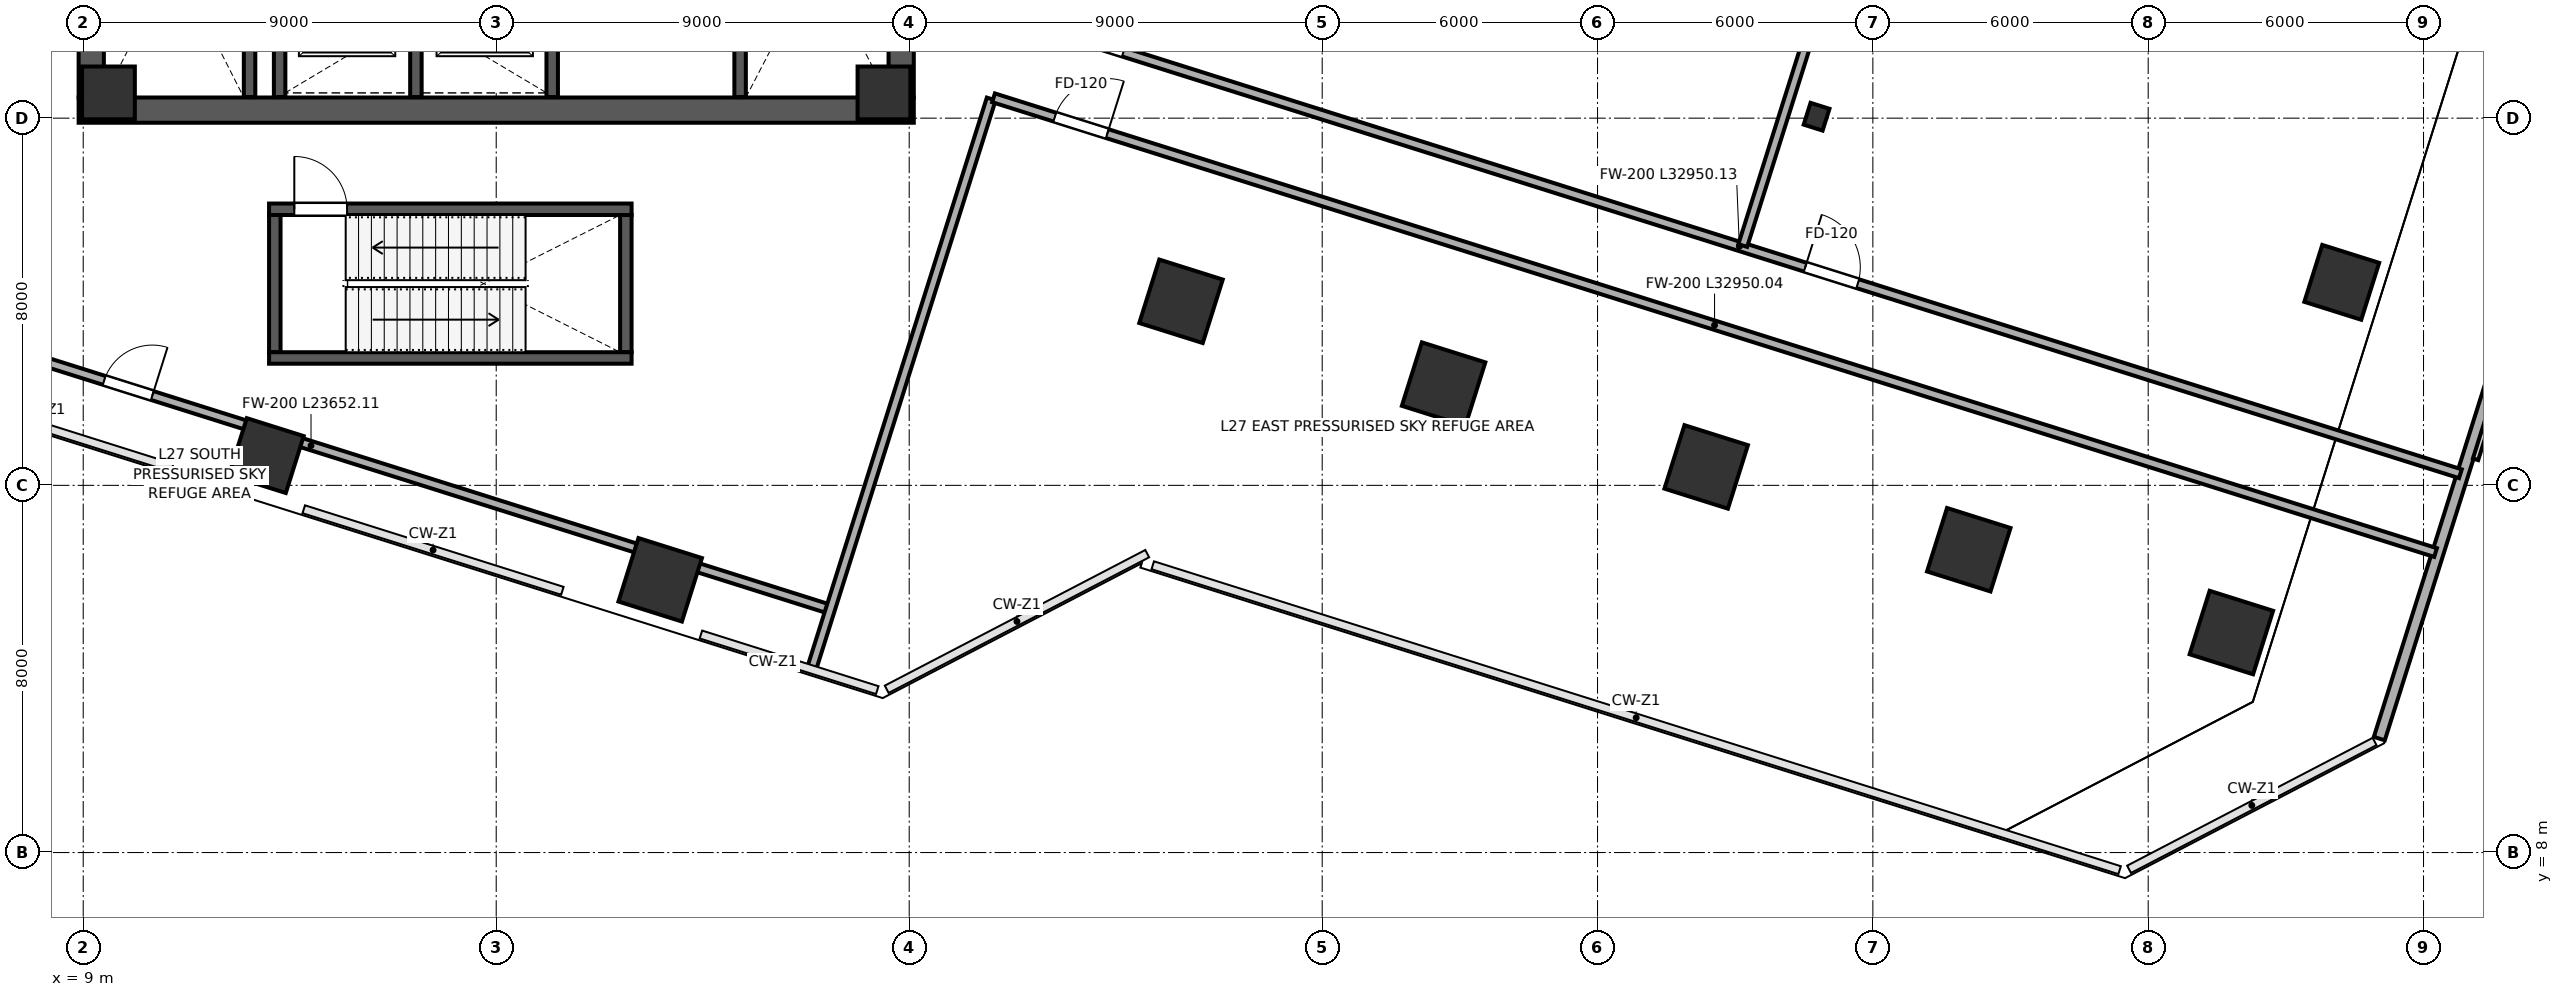
"""IFC4 building model, lengths in metres.
Left out: names, types, materials, properties, quantities, classifications, styles, units other than length and angle.
Written with IfcOpenShell. Run it as: python <this file> out.ifc"""

import sys

from ifc_helpers import new_model, si_unit, direction, frame, frame_2d, origin, origin_2d, place, context, subcontext, project, spatial, rectangle, i_section, extrude, clip, halfspace, source, transform, mapped, element, fill, save


model = new_model("IFC4")
c1 = context("Model", 3, precision=1e-05, world=origin(), true_north=direction((0.0, 1.0)))
c2 = subcontext(c1, "Body", "Model", "MODEL_VIEW")
j1 = project(units=[si_unit("LENGTHUNIT", "METRE"), si_unit("PLANEANGLEUNIT", "RADIAN")], contexts=[c1])
p1 = place(None, origin())
s1 = spatial("IfcSite", under=j1, at=p1, CompositionType="ELEMENT")
p2 = place(p1, origin())
s2 = spatial("IfcBuilding", under=s1, at=p2, CompositionType="ELEMENT")
p3 = place(p2, frame((0.0, 0.0, 122.2)))
s3 = spatial("IfcBuildingStorey", under=s2, at=p3, CompositionType="ELEMENT", Elevation=122.2)
m1 = source(origin(), c2, "Body", "SweptSolid", [
    extrude(rectangle(XDim=1.15, YDim=1.15, at=origin_2d()), origin(), (0.0, 0.0, 1.0), 5.399),
])
for number, where, z_axis, x_axis in (
    (1, (9.55, 24.55, 0.001), (0.0, 0.0, 1.0), (1.0, 0.0, 0.0)),
    (2, (26.45, 24.55, 0.001), (0.0, 0.0, 1.0), (1.0, 0.0, 0.0)),
):
    element("IfcColumn", number, at=place(p3, frame(where, z_axis=z_axis, x_axis=x_axis)), inside=s3, PredefinedType="COLUMN", context=c2, shape_type="MappedRepresentation", body=[
        mapped(m1, transform((0.0, 0.0, 0.0), scale=1.0)),
    ])
p4 = place(p3, frame((12.99, 16.648, 0.0), z_axis=(-0.121304858025, 0.070768627504, 0.990089355958), x_axis=(0.737750355409, 0.673751419219, 0.042230773063)))
e3 = element("IfcColumn", 3, at=p4, inside=s3, PredefinedType="COLUMN", context=c2, shape_type="Clipping", body=[
    clip(clip(extrude(rectangle(XDim=1.3, YDim=1.3, at=origin_2d()), origin(), (0.0, 0.0, 1.0), 5.454), halfspace(frame((0.0, 0.0, 0.116), z_axis=(0.0, 0.0, -1.0), x_axis=(1.0, 0.0, 0.0)), False)), halfspace(frame((0.0, 0.0, 5.338), z_axis=(0.0, 0.0, 1.0), x_axis=(1.0, 0.0, 0.0)), False)),
])
p5 = place(p3, frame((21.573, 13.942, 0.0), z_axis=(-0.14432009632, 0.002594719649, 0.989527653594), x_axis=(0.314652655865, 0.94821396347, 0.043404903384)))
e4 = element("IfcColumn", 4, at=p5, inside=s3, PredefinedType="COLUMN", context=c2, shape_type="Clipping", body=[
    clip(clip(extrude(rectangle(XDim=1.45, YDim=1.45, at=origin_2d()), origin(), (0.0, 0.0, 1.0), 5.457), halfspace(frame((0.0, 0.0, 0.133), z_axis=(0.0, 0.0, -1.0), x_axis=(1.0, 0.0, 0.0)), False)), halfspace(frame((0.0, 0.0, 5.324), z_axis=(0.0, 0.0, 1.0), x_axis=(1.0, 0.0, 0.0)), False)),
])
p6 = place(p3, frame((32.923, 20.01, 0.0), z_axis=(-0.097956530898, -0.089352846574, 0.991171320642), x_axis=(-0.422523517598, 0.905474614008, 0.039869793881)))
e5 = element("IfcColumn", 5, at=p6, inside=s3, PredefinedType="COLUMN", context=c2, shape_type="Clipping", body=[
    clip(clip(extrude(rectangle(XDim=1.45, YDim=1.45, at=origin_2d()), origin(), (0.0, 0.0, 1.0), 5.448), halfspace(frame((0.0, 0.0, 0.122), z_axis=(0.0, 0.0, -1.0), x_axis=(1.0, 0.0, 0.0)), False)), halfspace(frame((0.0, 0.0, 5.326), z_axis=(0.0, 0.0, 1.0), x_axis=(1.0, 0.0, 0.0)), False)),
])
p7 = place(p3, frame((38.646, 18.206, 0.0), z_axis=(-0.112659680016, -0.133980891682, 0.984559250204), x_axis=(-0.539415178106, 0.840393001033, 0.052639048661)))
e6 = element("IfcColumn", 6, at=p7, inside=s3, PredefinedType="COLUMN", context=c2, shape_type="Clipping", body=[
    clip(clip(extrude(rectangle(XDim=1.45, YDim=1.45, at=origin_2d()), origin(), (0.0, 0.0, 1.0), 5.485), halfspace(frame((0.0, 0.0, 0.162), z_axis=(0.0, 0.0, -1.0), x_axis=(1.0, 0.0, 0.0)), False)), halfspace(frame((0.0, 0.0, 5.323), z_axis=(0.0, 0.0, 1.0), x_axis=(1.0, 0.0, 0.0)), False)),
])
p8 = place(p3, frame((44.368, 16.402, 0.0), z_axis=(-0.126889220924, -0.177583141244, 0.975891056194), x_axis=(-0.605373038396, 0.793231359264, 0.06563150968)))
e7 = element("IfcColumn", 7, at=p8, inside=s3, PredefinedType="COLUMN", context=c2, shape_type="Clipping", body=[
    clip(clip(extrude(rectangle(XDim=1.45, YDim=1.45, at=origin_2d()), origin(), (0.0, 0.0, 1.0), 5.533), halfspace(frame((0.0, 0.0, 0.204), z_axis=(0.0, 0.0, -1.0), x_axis=(1.0, 0.0, 0.0)), False)), halfspace(frame((0.0, 0.0, 5.329), z_axis=(0.0, 0.0, 1.0), x_axis=(1.0, 0.0, 0.0)), False)),
])
p9 = place(p3, frame((46.773, 24.031, 0.0), z_axis=(-0.067285029027, -0.198230006674, 0.977843335777), x_axis=(-0.808599445891, 0.584982341111, 0.062949159587)))
e8 = element("IfcColumn", 8, at=p9, inside=s3, PredefinedType="COLUMN", context=c2, shape_type="Clipping", body=[
    clip(clip(extrude(i_section(OverallWidth=0.432, OverallDepth=0.498, WebThickness=0.056, FlangeThickness=0.089, FilletRadius=0.015, at=origin_2d()), origin(), (0.0, 0.0, 1.0), 5.522), halfspace(frame((0.0, 0.0, 0.065), z_axis=(0.0, 0.0, -1.0), x_axis=(1.0, 0.0, 0.0)), False)), halfspace(frame((0.0, 0.0, 5.457), z_axis=(0.0, 0.0, 1.0), x_axis=(1.0, 0.0, 0.0)), False)),
])
m2 = source(origin(), c2, "Body", "SweptSolid", [
    extrude(rectangle(XDim=1.45, YDim=1.45, at=origin_2d()), origin(), (0.0, 0.0, 1.0), 5.199),
])
p10 = place(p3, frame((50.09, 14.597, 0.001), z_axis=(0.0, 0.0, 1.0), x_axis=(-0.953716950748, 0.300705799504, 0.0)))
e9 = element("IfcColumn", 9, at=p10, inside=s3, PredefinedType="COLUMN", context=c2, shape_type="MappedRepresentation", body=[
    mapped(m2, transform((0.0, 0.0, 0.0), scale=1.0)),
])
m3 = source(origin(), c2, "Body", "SweptSolid", [
    extrude(rectangle(XDim=1.45, YDim=1.45, at=origin_2d()), origin(), (0.0, 0.0, 1.0), 5.199),
])
p11 = place(p3, frame((55.812, 12.793, 0.001), z_axis=(0.0, 0.0, 1.0), x_axis=(-0.953716950748, 0.300705799504, 0.0)))
e10 = element("IfcColumn", 10, at=p11, inside=s3, PredefinedType="COLUMN", context=c2, shape_type="MappedRepresentation", body=[
    mapped(m3, transform((0.0, 0.0, 0.0), scale=1.0)),
])
m4 = source(origin(), c2, "Body", "SweptSolid", [
    extrude(rectangle(XDim=1.3, YDim=1.3, at=origin_2d()), origin(), (0.0, 0.0, 1.0), 5.199),
])
p12 = place(p3, frame((58.218, 20.423, 0.001), z_axis=(0.0, 0.0, 1.0), x_axis=(-0.953716950748, 0.300705799504, 0.0)))
e11 = element("IfcColumn", 11, at=p12, inside=s3, PredefinedType="COLUMN", context=c2, shape_type="MappedRepresentation", body=[
    mapped(m4, transform((0.0, 0.0, 0.0), scale=1.0)),
])
p13 = place(p3, frame((59.037, 10.482, 0.0), z_axis=(0.0, 0.0, 1.0), x_axis=(0.300700770817, 0.953718536273, 0.0)))
e12 = element("IfcWall", 12, at=p13, inside=s3, PredefinedType="SOLIDWALL", context=c2, shape_type="SweptSolid", body=[
    extrude(rectangle(XDim=20.868, YDim=0.25, at=frame_2d((10.434, 0.0))), origin(), (0.0, 0.0, 1.0), 5.12),
])
p14 = place(p3, frame((8.242, 48.379, 0.0), z_axis=(0.0, 0.0, 1.0), x_axis=(-0.300707309749, -0.953716474569, 0.0)))
e13 = element("IfcWall", 13, at=p14, inside=s3, PredefinedType="SOLIDWALL", context=c2, shape_type="SweptSolid", body=[
    extrude(rectangle(XDim=25.268, YDim=0.25, at=frame_2d((12.634, 0.0))), origin(), (0.0, 0.0, 1.0), 4.255),
])
p15 = place(p3, frame((9.175, 24.45, 0.0), z_axis=(0.0, 0.0, 1.0), x_axis=(0.0, 1.0, 0.0)))
e14 = element("IfcWall", 14, at=p15, inside=s3, PredefinedType="SHEAR", context=c2, shape_type="SweptSolid", body=[
    extrude(rectangle(XDim=15.1, YDim=0.55, at=frame_2d((7.55, 0.0))), origin(), (0.0, 0.0, 1.0), 5.12),
])
p16 = place(p3, frame((26.825, 24.45, 0.0), z_axis=(0.0, 0.0, 1.0), x_axis=(0.0, 1.0, 0.0)))
e15 = element("IfcWall", 15, at=p16, inside=s3, PredefinedType="SHEAR", context=c2, shape_type="SweptSolid", body=[
    extrude(rectangle(XDim=15.1, YDim=0.55, at=frame_2d((7.55, 0.0))), origin(), (0.0, 0.0, 1.0), 5.12),
])
p17 = place(p16, frame((8.6, 0.0, 0.0)))
e16 = element("IfcOpeningElement", 16, at=p17, cuts=e15, PredefinedType="OPENING", context=c2, shape_type="SweptSolid", body=[
    extrude(rectangle(XDim=1.15, YDim=2.2, at=frame_2d((0.575, 1.1))), frame((0.0, 0.285, 0.0), z_axis=(0.0, -1.0, 0.0), x_axis=(1.0, 0.0, 0.0)), (0.0, 0.0, 1.0), 0.57),
])
p18 = place(p3, frame((8.9, 24.175, 0.0), z_axis=(0.0, 0.0, 1.0), x_axis=(1.0, 0.0, 0.0)))
e17 = element("IfcWall", 17, at=p18, inside=s3, PredefinedType="SHEAR", context=c2, shape_type="SweptSolid", body=[
    extrude(rectangle(XDim=18.2, YDim=0.55, at=frame_2d((9.1, 0.0))), origin(), (0.0, 0.0, 1.0), 5.12),
])
p19 = place(p3, frame((12.625, 24.46, 0.0), z_axis=(0.0, 0.0, 1.0), x_axis=(0.0, 1.0, 0.0)))
e18 = element("IfcWall", 18, at=p19, inside=s3, PredefinedType="SHEAR", context=c2, shape_type="SweptSolid", body=[
    extrude(rectangle(XDim=7.49, YDim=0.25, at=frame_2d((3.745, 0.0))), origin(), (0.0, 0.0, 1.0), 5.12),
])
p20 = place(p19, frame((5.85, 0.0, 0.0)))
e19 = element("IfcOpeningElement", 19, at=p20, cuts=e18, PredefinedType="OPENING", context=c2, shape_type="SweptSolid", body=[
    extrude(rectangle(XDim=1.15, YDim=2.2, at=frame_2d((0.575, 1.1))), frame((0.0, 0.135, 0.0), z_axis=(0.0, -1.0, 0.0), x_axis=(1.0, 0.0, 0.0)), (0.0, 0.0, 1.0), 0.27),
])
p21 = place(p3, frame((23.315, 24.46, 0.0), z_axis=(0.0, 0.0, 1.0), x_axis=(0.0, 1.0, 0.0)))
e20 = element("IfcWall", 20, at=p21, inside=s3, PredefinedType="SHEAR", context=c2, shape_type="SweptSolid", body=[
    extrude(rectangle(XDim=7.49, YDim=0.25, at=frame_2d((3.745, 0.0))), origin(), (0.0, 0.0, 1.0), 5.12),
])
for number, where, z_axis, x_axis in (
    (21, (13.28, 24.46, 0.0), (0.0, 0.0, 1.0), (0.0, 1.0, 0.0)),
    (22, (16.25, 24.46, 0.0), (0.0, 0.0, 1.0), (0.0, 1.0, 0.0)),
    (23, (19.22, 24.46, 0.0), (0.0, 0.0, 1.0), (0.0, 1.0, 0.0)),
):
    element("IfcWall", number, at=place(p3, frame(where, z_axis=z_axis, x_axis=x_axis)), inside=s3, PredefinedType="SHEAR", context=c2, shape_type="SweptSolid", body=[
        extrude(rectangle(XDim=3.49, YDim=0.25, at=frame_2d((1.745, 0.0))), origin(), (0.0, 0.0, 1.0), 5.12),
    ])
for number, where, z_axis, x_axis in (
    (24, (13.175, 18.9, 0.0), (0.0, 0.0, 1.0), (0.0, 1.0, 0.0)),
    (25, (20.825, 18.9, 0.0), (0.0, 0.0, 1.0), (0.0, 1.0, 0.0)),
):
    element("IfcWall", number, at=place(p3, frame(where, z_axis=z_axis, x_axis=x_axis)), inside=s3, PredefinedType="SHEAR", context=c2, shape_type="SweptSolid", body=[
        extrude(rectangle(XDim=2.99, YDim=0.25, at=frame_2d((1.495, 0.0))), origin(), (0.0, 0.0, 1.0), 5.12),
    ])
p22 = place(p3, frame((13.05, 18.775, 0.0), z_axis=(0.0, 0.0, 1.0), x_axis=(1.0, 0.0, 0.0)))
e26 = element("IfcWall", 26, at=p22, inside=s3, PredefinedType="SHEAR", context=c2, shape_type="SweptSolid", body=[
    extrude(rectangle(XDim=7.9, YDim=0.25, at=frame_2d((3.95, 0.0))), origin(), (0.0, 0.0, 1.0), 5.12),
])
p23 = place(p3, frame((13.05, 22.015, 0.0), z_axis=(0.0, 0.0, 1.0), x_axis=(1.0, 0.0, 0.0)))
e27 = element("IfcWall", 27, at=p23, inside=s3, PredefinedType="SHEAR", context=c2, shape_type="SweptSolid", body=[
    extrude(rectangle(XDim=7.9, YDim=0.25, at=frame_2d((3.95, 0.0))), origin(), (0.0, 0.0, 1.0), 5.12),
])
p24 = place(p23, frame((0.55, 0.0, 0.0)))
e28 = element("IfcOpeningElement", 28, at=p24, cuts=e27, PredefinedType="OPENING", context=c2, shape_type="SweptSolid", body=[
    extrude(rectangle(XDim=1.15, YDim=2.2, at=frame_2d((0.575, 1.1))), frame((0.0, 0.135, 0.0), z_axis=(0.0, -1.0, 0.0), x_axis=(1.0, 0.0, 0.0)), (0.0, 0.0, 1.0), 0.27),
])
p25 = place(p3, frame((2.686, 20.422, 0.0), z_axis=(0.0, 0.0, 1.0), x_axis=(0.953714083977, -0.30071489159, 0.0)))
e29 = element("IfcWall", 29, at=p25, inside=s3, PredefinedType="SOLIDWALL", context=c2, shape_type="SweptSolid", body=[
    extrude(rectangle(XDim=23.652, YDim=0.2, at=frame_2d((11.826, 0.0))), origin(), (0.0, 0.0, 1.0), 4.255),
])
p26 = place(p25, frame((7.1, 0.0, 0.0)))
e30 = element("IfcOpeningElement", 30, at=p26, cuts=e29, PredefinedType="OPENING", context=c2, shape_type="SweptSolid", body=[
    extrude(rectangle(XDim=1.1, YDim=2.2, at=frame_2d((0.55, 1.1))), frame((0.0, 0.11, 0.0), z_axis=(0.0, -1.0, 0.0), x_axis=(1.0, 0.0, 0.0)), (0.0, 0.0, 1.0), 0.22),
])
p27 = place(p3, frame((24.884, 12.039, 0.0), z_axis=(0.0, 0.0, 1.0), x_axis=(0.300719056834, 0.953712770627, 0.0)))
e31 = element("IfcWall", 31, at=p27, inside=s3, PredefinedType="SOLIDWALL", context=c2, shape_type="SweptSolid", body=[
    extrude(rectangle(XDim=12.98, YDim=0.2, at=frame_2d((6.49, 0.0))), origin(), (0.0, 0.0, 1.0), 5.12),
])
p28 = place(p3, frame((28.837, 24.444, 0.0), z_axis=(0.0, 0.0, 1.0), x_axis=(0.953717618417, -0.300703681921, 0.0)))
e32 = element("IfcWall", 32, at=p28, inside=s3, PredefinedType="SOLIDWALL", context=c2, shape_type="SweptSolid", body=[
    extrude(rectangle(XDim=32.95, YDim=0.2, at=frame_2d((16.475, 0.0))), origin(), (0.0, 0.0, 1.0), 4.255),
])
p29 = place(p28, frame((1.4, 0.0, 0.0)))
e33 = element("IfcOpeningElement", 33, at=p29, cuts=e32, PredefinedType="OPENING", context=c2, shape_type="SweptSolid", body=[
    extrude(rectangle(XDim=1.2, YDim=2.2, at=frame_2d((0.6, 1.1))), frame((0.0, 0.11, 0.0), z_axis=(0.0, -1.0, 0.0), x_axis=(1.0, 0.0, 0.0)), (0.0, 0.0, 1.0), 0.22),
])
p30 = place(p3, frame((29.379, 26.161, 0.0), z_axis=(0.0, 0.0, 1.0), x_axis=(0.953715493479, -0.300710421334, 0.0)))
e34 = element("IfcWall", 34, at=p30, inside=s3, PredefinedType="SOLIDWALL", context=c2, shape_type="SweptSolid", body=[
    extrude(rectangle(XDim=32.95, YDim=0.2, at=frame_2d((16.475, 0.0))), origin(), (0.0, 0.0, 1.0), 4.255),
])
p31 = place(p30, frame((1.2, 0.0, 0.0)))
e35 = element("IfcOpeningElement", 35, at=p31, cuts=e34, PredefinedType="OPENING", context=c2, shape_type="SweptSolid", body=[
    extrude(rectangle(XDim=1.2, YDim=2.2, at=frame_2d((0.6, 1.1))), frame((0.0, 0.11, 0.0), z_axis=(0.0, -1.0, 0.0), x_axis=(1.0, 0.0, 0.0)), (0.0, 0.0, 1.0), 0.22),
])
p32 = place(p30, frame((17.98, 0.0, 0.0)))
e36 = element("IfcOpeningElement", 36, at=p32, cuts=e34, PredefinedType="OPENING", context=c2, shape_type="SweptSolid", body=[
    extrude(rectangle(XDim=1.2, YDim=2.2, at=frame_2d((0.6, 1.1))), frame((0.0, 0.11, 0.0), z_axis=(0.0, -1.0, 0.0), x_axis=(1.0, 0.0, 0.0)), (0.0, 0.0, 1.0), 0.22),
])
p33 = place(p3, frame((45.165, 21.225, 0.0), z_axis=(0.0, 0.0, 1.0), x_axis=(0.300708557869, 0.953716081035, 0.0)))
e37 = element("IfcWall", 37, at=p33, inside=s3, PredefinedType="SOLIDWALL", context=c2, shape_type="SweptSolid", body=[
    extrude(rectangle(XDim=19.18, YDim=0.2, at=frame_2d((9.59, 0.0))), origin(), (0.0, 0.0, 1.0), 4.255),
])
m5 = source(origin(), c2, "Body", "SweptSolid", [
    extrude(rectangle(XDim=1.15, YDim=2.2, at=frame_2d((0.575, 1.1))), frame((0.0, 0.025, 0.0), z_axis=(0.0, -1.0, 0.0), x_axis=(1.0, 0.0, 0.0)), (0.0, 0.0, 1.0), 0.05),
])
p34 = place(p24, origin())
e38 = element("IfcDoor", 38, at=p34, inside=s3, OperationType="SINGLE_SWING_LEFT", PredefinedType="DOOR", context=c2, shape_type="MappedRepresentation", body=[
    mapped(m5, transform((0.0, 0.0, 0.0), scale=1.0)),
])
fill(e28, e38)
m6 = source(origin(), c2, "Body", "SweptSolid", [
    extrude(rectangle(XDim=1.1, YDim=2.2, at=frame_2d((0.55, 1.1))), frame((0.0, 0.025, 0.0), z_axis=(0.0, -1.0, 0.0), x_axis=(1.0, 0.0, 0.0)), (0.0, 0.0, 1.0), 0.05),
])
p35 = place(p26, origin())
e39 = element("IfcDoor", 39, at=p35, inside=s3, OperationType="SINGLE_SWING_RIGHT", PredefinedType="DOOR", context=c2, shape_type="MappedRepresentation", body=[
    mapped(m6, transform((0.0, 0.0, 0.0), scale=1.0)),
])
fill(e30, e39)
m7 = source(origin(), c2, "Body", "SweptSolid", [
    extrude(rectangle(XDim=1.2, YDim=2.2, at=frame_2d((0.6, 1.1))), frame((0.0, 0.025, 0.0), z_axis=(0.0, -1.0, 0.0), x_axis=(1.0, 0.0, 0.0)), (0.0, 0.0, 1.0), 0.05),
])
p36 = place(p29, origin())
e40 = element("IfcDoor", 40, at=p36, inside=s3, OperationType="SINGLE_SWING_RIGHT", PredefinedType="DOOR", context=c2, shape_type="MappedRepresentation", body=[
    mapped(m7, transform((0.0, 0.0, 0.0), scale=1.0)),
])
fill(e33, e40)
p37 = place(p31, origin())
e41 = element("IfcDoor", 41, at=p37, inside=s3, OperationType="SINGLE_SWING_RIGHT", PredefinedType="DOOR", context=c2, shape_type="MappedRepresentation", body=[
    mapped(m7, transform((0.0, 0.0, 0.0), scale=1.0)),
])
fill(e35, e41)
p38 = place(p32, origin())
e42 = element("IfcDoor", 42, at=p38, inside=s3, OperationType="SINGLE_SWING_LEFT", PredefinedType="DOOR", context=c2, shape_type="MappedRepresentation", body=[
    mapped(m7, transform((0.0, 0.0, 0.0), scale=1.0)),
])
fill(e36, e42)
save(model, sys.argv[1])
